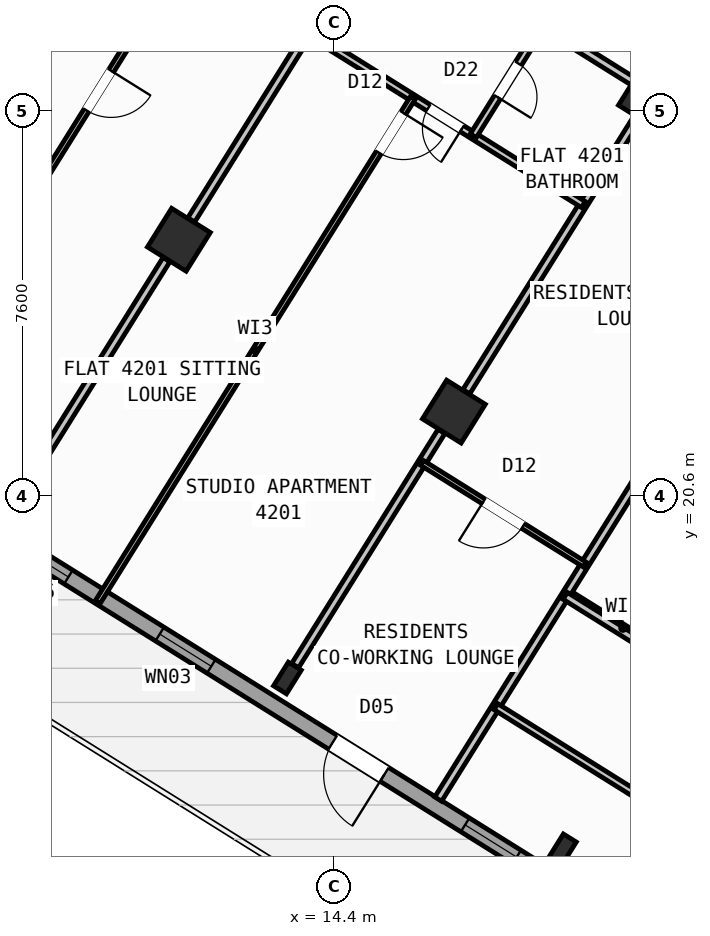
"""IFC4 building model, lengths in metres.
Left out: names, types, materials, properties, quantities, classifications, styles, units other than length and angle.
Written with IfcOpenShell. Run it as: python <this file> out.ifc"""

import sys

from ifc_helpers import new_model, si_unit, direction, frame, frame_2d, origin, origin_2d, place, context, subcontext, project, spatial, rectangle, hollow_rectangle, i_section, extrude, source, transform, mapped, element, fill, save


model = new_model("IFC4")
c1 = context("Model", 3, precision=1e-05, world=origin(), true_north=direction((0.0, 1.0)))
c2 = subcontext(c1, "Body", "Model", "MODEL_VIEW")
j1 = project(units=[si_unit("LENGTHUNIT", "METRE"), si_unit("PLANEANGLEUNIT", "RADIAN")], contexts=[c1])
p1 = place(None, origin())
s1 = spatial("IfcSite", under=j1, at=p1, CompositionType="ELEMENT")
p2 = place(p1, origin())
s2 = spatial("IfcBuilding", under=s1, at=p2, CompositionType="ELEMENT")
p3 = place(p2, frame((0.0, 0.0, 165.9)))
s3 = spatial("IfcBuildingStorey", under=s2, at=p3, CompositionType="ELEMENT", Elevation=165.9)
m1 = source(origin(), c2, "Body", "SweptSolid", [
    extrude(i_section(OverallWidth=0.3, OverallDepth=0.55, WebThickness=0.015, FlangeThickness=0.029, at=origin_2d()), origin(), (0.0, 0.0, 1.0), 3.6),
])
p4 = place(p3, frame((18.906, 13.612, 0.0), z_axis=(0.0, 0.0, 1.0), x_axis=(-0.848048096156, 0.529919264233, 0.0)))
e1 = element("IfcColumn", 1, at=p4, inside=s3, PredefinedType="COLUMN", context=c2, shape_type="MappedRepresentation", body=[
    mapped(m1, transform((0.0, 0.0, 0.0), scale=1.0)),
])
m2 = source(origin(), c2, "Body", "SweptSolid", [
    extrude(hollow_rectangle(XDim=0.9, YDim=0.9, WallThickness=0.036, at=origin_2d()), origin(), (0.0, 0.0, 1.0), 3.6),
])
for number, where, z_axis, x_axis in (
    (2, (20.632, 28.452, 0.0), (0.0, 0.0, 1.0), (-0.848, 0.53, 0.0)),
    (3, (16.764, 22.261, 0.0), (0.0, 0.0, 1.0), (-0.848, 0.53, 0.0)),
):
    element("IfcColumn", number, at=place(p3, frame(where, z_axis=z_axis, x_axis=x_axis)), inside=s3, PredefinedType="COLUMN", context=c2, shape_type="MappedRepresentation", body=[
        mapped(m2, transform((0.0, 0.0, 0.0), scale=1.0)),
    ])
p5 = place(p3, frame((13.478, 17.003, 0.0), z_axis=(0.0, 0.0, 1.0), x_axis=(-0.848048096156, 0.529919264233, 0.0)))
e4 = element("IfcColumn", 4, at=p5, inside=s3, PredefinedType="COLUMN", context=c2, shape_type="MappedRepresentation", body=[
    mapped(m1, transform((0.0, 0.0, 0.0), scale=1.0)),
])
p6 = place(p3, frame((11.336, 25.653, 0.0), z_axis=(0.0, 0.0, 1.0), x_axis=(-0.848048096156, 0.529919264233, 0.0)))
e5 = element("IfcColumn", 5, at=p6, inside=s3, PredefinedType="COLUMN", context=c2, shape_type="MappedRepresentation", body=[
    mapped(m2, transform((0.0, 0.0, 0.0), scale=1.0)),
])
p7 = place(p3, frame((29.268, 6.429, 0.0), z_axis=(0.0, 0.0, 1.0), x_axis=(-0.848049971435, 0.529916263149, 0.0)))
e6 = element("IfcWall", 6, at=p7, inside=s3, PredefinedType="STANDARD", context=c2, shape_type="SweptSolid", body=[
    extrude(rectangle(XDim=31.588, YDim=0.32, at=frame_2d((15.794, 0.0))), origin(), (0.0, 0.0, 1.0), 3.32),
])
p8 = place(p7, frame((16.362, 0.0, 0.0)))
e7 = element("IfcOpeningElement", 7, at=p8, cuts=e6, PredefinedType="OPENING", context=c2, shape_type="SweptSolid", body=[
    extrude(rectangle(XDim=1.2, YDim=2.15, at=frame_2d((0.6, 1.075))), frame((0.0, 0.17, 0.0), z_axis=(0.0, -1.0, 0.0), x_axis=(1.0, 0.0, 0.0)), (0.0, 0.0, 1.0), 0.34),
])
p9 = place(p7, frame((2.989, 0.0, 0.8)))
e8 = element("IfcOpeningElement", 8, at=p9, cuts=e6, PredefinedType="OPENING", context=c2, shape_type="SweptSolid", body=[
    extrude(rectangle(XDim=2.1, YDim=1.55, at=frame_2d((1.05, 0.775))), frame((0.0, 0.17, 0.0), z_axis=(0.0, -1.0, 0.0), x_axis=(1.0, 0.0, 0.0)), (0.0, 0.0, 1.0), 0.34),
])
p10 = place(p7, frame((8.359, 0.0, 0.8)))
e9 = element("IfcOpeningElement", 9, at=p10, cuts=e6, PredefinedType="OPENING", context=c2, shape_type="SweptSolid", body=[
    extrude(rectangle(XDim=2.1, YDim=1.55, at=frame_2d((1.05, 0.775))), frame((0.0, 0.17, 0.0), z_axis=(0.0, -1.0, 0.0), x_axis=(1.0, 0.0, 0.0)), (0.0, 0.0, 1.0), 0.34),
])
p11 = place(p7, frame((13.284, 0.0, 0.95)))
e10 = element("IfcOpeningElement", 10, at=p11, cuts=e6, PredefinedType="OPENING", context=c2, shape_type="SweptSolid", body=[
    extrude(rectangle(XDim=1.2, YDim=1.4, at=frame_2d((0.6, 0.7))), frame((0.0, 0.17, 0.0), z_axis=(0.0, -1.0, 0.0), x_axis=(1.0, 0.0, 0.0)), (0.0, 0.0, 1.0), 0.34),
])
p12 = place(p7, frame((20.39, 0.0, 0.95)))
e11 = element("IfcOpeningElement", 11, at=p12, cuts=e6, PredefinedType="OPENING", context=c2, shape_type="SweptSolid", body=[
    extrude(rectangle(XDim=1.2, YDim=1.4, at=frame_2d((0.6, 0.7))), frame((0.0, 0.17, 0.0), z_axis=(0.0, -1.0, 0.0), x_axis=(1.0, 0.0, 0.0)), (0.0, 0.0, 1.0), 0.34),
])
p13 = place(p7, frame((23.715, 0.0, 1.0)))
e12 = element("IfcOpeningElement", 12, at=p13, cuts=e6, PredefinedType="OPENING", context=c2, shape_type="SweptSolid", body=[
    extrude(rectangle(XDim=0.9, YDim=1.25, at=frame_2d((0.45, 0.625))), frame((0.0, 0.17, 0.0), z_axis=(0.0, -1.0, 0.0), x_axis=(1.0, 0.0, 0.0)), (0.0, 0.0, 1.0), 0.34),
])
p14 = place(p7, frame((26.106, 0.0, 0.85)))
e13 = element("IfcOpeningElement", 13, at=p14, cuts=e6, PredefinedType="OPENING", context=c2, shape_type="SweptSolid", body=[
    extrude(rectangle(XDim=1.5, YDim=1.5, at=frame_2d((0.75, 0.75))), frame((0.0, 0.17, 0.0), z_axis=(0.0, -1.0, 0.0), x_axis=(1.0, 0.0, 0.0)), (0.0, 0.0, 1.0), 0.34),
])
p15 = place(p7, frame((29.068, 0.0, 0.85)))
e14 = element("IfcOpeningElement", 14, at=p15, cuts=e6, PredefinedType="OPENING", context=c2, shape_type="SweptSolid", body=[
    extrude(rectangle(XDim=1.8, YDim=1.5, at=frame_2d((0.9, 0.75))), frame((0.0, 0.17, 0.0), z_axis=(0.0, -1.0, 0.0), x_axis=(1.0, 0.0, 0.0)), (0.0, 0.0, 1.0), 0.34),
])
p16 = place(p3, frame((2.415, 23.452, 0.0), z_axis=(0.0, 0.0, 1.0), x_axis=(0.52991049553, 0.848053575387, 0.0)))
e15 = element("IfcWall", 15, at=p16, inside=s3, PredefinedType="STANDARD", context=c2, shape_type="SweptSolid", body=[
    extrude(rectangle(XDim=21.587, YDim=0.32, at=frame_2d((10.794, 0.0))), origin(), (0.0, 0.0, 1.0), 2.795),
])
p17 = place(p16, frame((1.673, 0.0, 0.8)))
e16 = element("IfcOpeningElement", 16, at=p17, cuts=e15, PredefinedType="OPENING", context=c2, shape_type="SweptSolid", body=[
    extrude(rectangle(XDim=2.1, YDim=1.55, at=frame_2d((1.05, 0.775))), frame((0.0, 0.17, 0.0), z_axis=(0.0, -1.0, 0.0), x_axis=(1.0, 0.0, 0.0)), (0.0, 0.0, 1.0), 0.34),
])
p18 = place(p16, frame((8.334, 0.0, 0.85)))
e17 = element("IfcOpeningElement", 17, at=p18, cuts=e15, PredefinedType="OPENING", context=c2, shape_type="SweptSolid", body=[
    extrude(rectangle(XDim=1.8, YDim=1.5, at=frame_2d((0.9, 0.75))), frame((0.0, 0.17, 0.0), z_axis=(0.0, -1.0, 0.0), x_axis=(1.0, 0.0, 0.0)), (0.0, 0.0, 1.0), 0.34),
])
p19 = place(p16, frame((17.172, 0.0, 0.85)))
e18 = element("IfcOpeningElement", 18, at=p19, cuts=e15, PredefinedType="OPENING", context=c2, shape_type="SweptSolid", body=[
    extrude(rectangle(XDim=1.5, YDim=1.5, at=frame_2d((0.75, 0.75))), frame((0.0, 0.17, 0.0), z_axis=(0.0, -1.0, 0.0), x_axis=(1.0, 0.0, 0.0)), (0.0, 0.0, 1.0), 0.34),
])
p20 = place(p3, frame((14.138, 41.825, 0.0), z_axis=(0.0, 0.0, 1.0), x_axis=(0.848046498049, -0.529921821731, 0.0)))
e19 = element("IfcWall", 19, at=p20, inside=s3, PredefinedType="STANDARD", context=c2, shape_type="SweptSolid", body=[
    extrude(rectangle(XDim=31.588, YDim=0.32, at=frame_2d((15.794, 0.0))), origin(), (0.0, 0.0, 1.0), 3.32),
])
p21 = place(p20, frame((3.253, 0.0, 0.0)))
e20 = element("IfcOpeningElement", 20, at=p21, cuts=e19, PredefinedType="OPENING", context=c2, shape_type="SweptSolid", body=[
    extrude(rectangle(XDim=1.05, YDim=2.15, at=frame_2d((0.525, 1.075))), frame((0.0, 0.17, 0.0), z_axis=(0.0, -1.0, 0.0), x_axis=(1.0, 0.0, 0.0)), (0.0, 0.0, 1.0), 0.34),
])
p22 = place(p20, frame((0.863, 0.0, 0.85)))
e21 = element("IfcOpeningElement", 21, at=p22, cuts=e19, PredefinedType="OPENING", context=c2, shape_type="SweptSolid", body=[
    extrude(rectangle(XDim=1.8, YDim=1.5, at=frame_2d((0.9, 0.75))), frame((0.0, 0.17, 0.0), z_axis=(0.0, -1.0, 0.0), x_axis=(1.0, 0.0, 0.0)), (0.0, 0.0, 1.0), 0.34),
])
p23 = place(p20, frame((8.494, 0.0, 0.85)))
e22 = element("IfcOpeningElement", 22, at=p23, cuts=e19, PredefinedType="OPENING", context=c2, shape_type="SweptSolid", body=[
    extrude(rectangle(XDim=1.8, YDim=1.5, at=frame_2d((0.9, 0.75))), frame((0.0, 0.17, 0.0), z_axis=(0.0, -1.0, 0.0), x_axis=(1.0, 0.0, 0.0)), (0.0, 0.0, 1.0), 0.34),
])
p24 = place(p20, frame((13.874, 0.0, 0.85)))
e23 = element("IfcOpeningElement", 23, at=p24, cuts=e19, PredefinedType="OPENING", context=c2, shape_type="SweptSolid", body=[
    extrude(rectangle(XDim=1.5, YDim=1.5, at=frame_2d((0.75, 0.75))), frame((0.0, 0.17, 0.0), z_axis=(0.0, -1.0, 0.0), x_axis=(1.0, 0.0, 0.0)), (0.0, 0.0, 1.0), 0.34),
])
p25 = place(p20, frame((17.104, 0.0, 1.0)))
e24 = element("IfcOpeningElement", 24, at=p25, cuts=e19, PredefinedType="OPENING", context=c2, shape_type="SweptSolid", body=[
    extrude(rectangle(XDim=0.9, YDim=1.25, at=frame_2d((0.45, 0.625))), frame((0.0, 0.17, 0.0), z_axis=(0.0, -1.0, 0.0), x_axis=(1.0, 0.0, 0.0)), (0.0, 0.0, 1.0), 0.34),
])
p26 = place(p20, frame((22.144, 0.0, 1.0)))
e25 = element("IfcOpeningElement", 25, at=p26, cuts=e19, PredefinedType="OPENING", context=c2, shape_type="SweptSolid", body=[
    extrude(rectangle(XDim=0.9, YDim=1.25, at=frame_2d((0.45, 0.625))), frame((0.0, 0.17, 0.0), z_axis=(0.0, -1.0, 0.0), x_axis=(1.0, 0.0, 0.0)), (0.0, 0.0, 1.0), 0.34),
])
p27 = place(p20, frame((27.744, 0.0, 1.0)))
e26 = element("IfcOpeningElement", 26, at=p27, cuts=e19, PredefinedType="OPENING", context=c2, shape_type="SweptSolid", body=[
    extrude(rectangle(XDim=0.9, YDim=1.25, at=frame_2d((0.45, 0.625))), frame((0.0, 0.17, 0.0), z_axis=(0.0, -1.0, 0.0), x_axis=(1.0, 0.0, 0.0)), (0.0, 0.0, 1.0), 0.34),
])
p28 = place(p3, frame((21.206, 17.292, 0.0), z_axis=(0.0, 0.0, 1.0), x_axis=(-0.848050851465, 0.529914854792, 0.0)))
e27 = element("IfcWall", 27, at=p28, inside=s3, PredefinedType="PARTITIONING", context=c2, shape_type="SweptSolid", body=[
    extrude(rectangle(XDim=2.61, YDim=0.16, at=frame_2d((1.305, 0.0))), origin(), (0.0, 0.0, 1.0), 3.31),
])
p29 = place(p3, frame((23.899, 26.529, 0.0), z_axis=(0.0, 0.0, 1.0), x_axis=(-0.529917716469, -0.848049063305, 0.0)))
e28 = element("IfcWall", 28, at=p29, inside=s3, PredefinedType="PARTITIONING", context=c2, shape_type="SweptSolid", body=[
    extrude(rectangle(XDim=14.05, YDim=0.16, at=frame_2d((7.025, 0.0))), origin(), (0.0, 0.0, 1.0), 3.31),
])
p30 = place(p3, frame((25.065, 28.394, 0.0), z_axis=(0.0, 0.0, 1.0), x_axis=(-0.848048310262, 0.529918921593, 0.0)))
e29 = element("IfcWall", 29, at=p30, inside=s3, PredefinedType="PARTITIONING", context=c2, shape_type="SweptSolid", body=[
    extrude(rectangle(XDim=16.73, YDim=0.16, at=frame_2d((8.365, 0.0))), origin(), (0.0, 0.0, 1.0), 3.31),
])
p31 = place(p30, frame((2.22, 0.0, 0.0)))
e30 = element("IfcOpeningElement", 30, at=p31, cuts=e29, PredefinedType="OPENING", context=c2, shape_type="SweptSolid", body=[
    extrude(rectangle(XDim=0.86, YDim=2.05, at=frame_2d((0.43, 1.025))), frame((0.0, 0.09, 0.0), z_axis=(0.0, -1.0, 0.0), x_axis=(1.0, 0.0, 0.0)), (0.0, 0.0, 1.0), 0.18),
])
p32 = place(p30, frame((7.82, 0.0, 0.0)))
e31 = element("IfcOpeningElement", 31, at=p32, cuts=e29, PredefinedType="OPENING", context=c2, shape_type="SweptSolid", body=[
    extrude(rectangle(XDim=1.0, YDim=2.1, at=frame_2d((0.5, 1.05))), frame((0.0, 0.09, 0.0), z_axis=(0.0, -1.0, 0.0), x_axis=(1.0, 0.0, 0.0)), (0.0, 0.0, 1.0), 0.18),
])
p33 = place(p30, frame((12.95, 0.0, 0.0)))
e32 = element("IfcOpeningElement", 32, at=p33, cuts=e29, PredefinedType="OPENING", context=c2, shape_type="SweptSolid", body=[
    extrude(rectangle(XDim=1.0, YDim=2.1, at=frame_2d((0.5, 1.05))), frame((0.0, 0.09, 0.0), z_axis=(0.0, -1.0, 0.0), x_axis=(1.0, 0.0, 0.0)), (0.0, 0.0, 1.0), 0.18),
])
p34 = place(p3, frame((20.293, 28.782, 0.0), z_axis=(0.0, 0.0, 1.0), x_axis=(-0.848040881926, 0.529930809241, 0.0)))
e33 = element("IfcWall", 33, at=p34, inside=s3, PredefinedType="PARTITIONING", context=c2, shape_type="SweptSolid", body=[
    extrude(rectangle(XDim=5.476, YDim=0.16, at=frame_2d((2.738, 0.0))), origin(), (0.0, 0.0, 1.0), 2.795),
])
p35 = place(p34, frame((3.568, 0.0, 0.0)))
e34 = element("IfcOpeningElement", 34, at=p35, cuts=e33, PredefinedType="OPENING", context=c2, shape_type="SweptSolid", body=[
    extrude(rectangle(XDim=1.0, YDim=2.1, at=frame_2d((0.5, 1.05))), frame((0.0, 0.09, 0.0), z_axis=(0.0, -1.0, 0.0), x_axis=(1.0, 0.0, 0.0)), (0.0, 0.0, 1.0), 0.18),
])
p36 = place(p3, frame((20.387, 28.06, 0.0), z_axis=(0.0, 0.0, 1.0), x_axis=(-0.529902564924, -0.848058530814, 0.0)))
e35 = element("IfcWall", 35, at=p36, inside=s3, PredefinedType="PARTITIONING", context=c2, shape_type="SweptSolid", body=[
    extrude(rectangle(XDim=6.376, YDim=0.16, at=frame_2d((3.188, 0.0))), origin(), (0.0, 0.0, 1.0), 2.795),
])
p37 = place(p3, frame((16.519, 21.87, 0.0), z_axis=(0.0, 0.0, 1.0), x_axis=(-0.529922447305, -0.848046107144, 0.0)))
e36 = element("IfcWall", 36, at=p37, inside=s3, PredefinedType="PARTITIONING", context=c2, shape_type="SweptSolid", body=[
    extrude(rectangle(XDim=5.451, YDim=0.16, at=frame_2d((2.726, 0.0))), origin(), (0.0, 0.0, 1.0), 2.795),
])
p38 = place(p3, frame((19.346, 19.242, 0.0), z_axis=(0.0, 0.0, 1.0), x_axis=(-0.848059820872, 0.529900500304, 0.0)))
e37 = element("IfcWall", 37, at=p38, inside=s3, PredefinedType="PARTITIONING", context=c2, shape_type="SweptSolid", body=[
    extrude(rectangle(XDim=3.79, YDim=0.11, at=frame_2d((1.895, 0.0))), origin(), (0.0, 0.0, 1.0), 3.31),
])
p39 = place(p38, frame((1.435, 0.0, 0.0)))
e38 = element("IfcOpeningElement", 38, at=p39, cuts=e37, PredefinedType="OPENING", context=c2, shape_type="SweptSolid", body=[
    extrude(rectangle(XDim=0.92, YDim=2.08, at=frame_2d((0.46, 1.04))), frame((0.0, 0.065, 0.0), z_axis=(0.0, -1.0, 0.0), x_axis=(1.0, 0.0, 0.0)), (0.0, 0.0, 1.0), 0.13),
])
p40 = place(p3, frame((14.96, 31.452, 0.0), z_axis=(0.0, 0.0, 1.0), x_axis=(-0.529947310719, -0.848030570122, 0.0)))
e39 = element("IfcWall", 39, at=p40, inside=s3, PredefinedType="PARTITIONING", context=c2, shape_type="SweptSolid", body=[
    extrude(rectangle(XDim=6.376, YDim=0.16, at=frame_2d((3.188, 0.0))), origin(), (0.0, 0.0, 1.0), 2.795),
])
p41 = place(p3, frame((11.091, 25.261, 0.0), z_axis=(0.0, 0.0, 1.0), x_axis=(-0.52994257524, -0.848033529377, 0.0)))
e40 = element("IfcWall", 40, at=p41, inside=s3, PredefinedType="PARTITIONING", context=c2, shape_type="SweptSolid", body=[
    extrude(rectangle(XDim=5.451, YDim=0.16, at=frame_2d((2.726, 0.0))), origin(), (0.0, 0.0, 1.0), 2.795),
])
p42 = place(p3, frame((19.318, 26.349, 0.0), z_axis=(0.0, 0.0, 1.0), x_axis=(-0.848039019877, 0.529933789039, 0.0)))
e41 = element("IfcWall", 41, at=p42, inside=s3, PredefinedType="PLUMBINGWALL", context=c2, shape_type="SweptSolid", body=[
    extrude(rectangle(XDim=6.4, YDim=0.14, at=frame_2d((3.2, 0.0))), origin(), (0.0, 0.0, 1.0), 3.31),
])
p43 = place(p42, frame((2.824, 0.0, 0.0)))
e42 = element("IfcOpeningElement", 42, at=p43, cuts=e41, PredefinedType="OPENING", context=c2, shape_type="SweptSolid", body=[
    extrude(rectangle(XDim=0.78, YDim=2.05, at=frame_2d((0.39, 1.025))), frame((0.0, 0.08, 0.0), z_axis=(0.0, -1.0, 0.0), x_axis=(1.0, 0.0, 0.0)), (0.0, 0.0, 1.0), 0.16),
])
p44 = place(p3, frame((18.514, 29.894, 0.0), z_axis=(0.0, 0.0, 1.0), x_axis=(-0.529913878929, -0.848051461244, 0.0)))
e43 = element("IfcWall", 43, at=p44, inside=s3, PredefinedType="PLUMBINGWALL", context=c2, shape_type="SweptSolid", body=[
    extrude(rectangle(XDim=2.58, YDim=0.14, at=frame_2d((1.29, 0.0))), origin(), (0.0, 0.0, 1.0), 3.31),
])
p45 = place(p44, frame((0.9, 0.0, 0.0)))
e44 = element("IfcOpeningElement", 44, at=p45, cuts=e43, PredefinedType="OPENING", context=c2, shape_type="SweptSolid", body=[
    extrude(rectangle(XDim=0.78, YDim=2.05, at=frame_2d((0.39, 1.025))), frame((0.0, 0.08, 0.0), z_axis=(0.0, -1.0, 0.0), x_axis=(1.0, 0.0, 0.0)), (0.0, 0.0, 1.0), 0.16),
])
p46 = place(p3, frame((15.953, 28.452, 0.0), z_axis=(0.0, 0.0, 1.0), x_axis=(-0.529931645041, -0.848040359643, 0.0)))
e45 = element("IfcWall", 45, at=p46, inside=s3, PredefinedType="PARTITIONING", context=c2, shape_type="SweptSolid", body=[
    extrude(rectangle(XDim=11.74, YDim=0.11, at=frame_2d((5.87, 0.0))), origin(), (0.0, 0.0, 1.0), 3.31),
])
p47 = place(p46, frame((0.35, 0.0, 0.0)))
e46 = element("IfcOpeningElement", 46, at=p47, cuts=e45, PredefinedType="OPENING", context=c2, shape_type="SweptSolid", body=[
    extrude(rectangle(XDim=0.92, YDim=2.08, at=frame_2d((0.46, 1.04))), frame((0.0, 0.065, 0.0), z_axis=(0.0, -1.0, 0.0), x_axis=(1.0, 0.0, 0.0)), (0.0, 0.0, 1.0), 0.13),
])
p48 = place(p3, frame((12.798, 33.465, 0.0), z_axis=(0.0, 0.0, 1.0), x_axis=(-0.529916182913, -0.848050021571, 0.0)))
e47 = element("IfcWall", 47, at=p48, inside=s3, PredefinedType="PARTITIONING", context=c2, shape_type="SweptSolid", body=[
    extrude(rectangle(XDim=14.32, YDim=0.11, at=frame_2d((7.16, 0.0))), origin(), (0.0, 0.0, 1.0), 3.31),
])
p49 = place(p48, frame((0.76, 0.0, 0.0)))
e48 = element("IfcOpeningElement", 48, at=p49, cuts=e47, PredefinedType="OPENING", context=c2, shape_type="SweptSolid", body=[
    extrude(rectangle(XDim=0.78, YDim=2.05, at=frame_2d((0.39, 1.025))), frame((0.0, 0.065, 0.0), z_axis=(0.0, -1.0, 0.0), x_axis=(1.0, 0.0, 0.0)), (0.0, 0.0, 1.0), 0.13),
])
p50 = place(p48, frame((5.281, 0.0, 0.0)))
e49 = element("IfcOpeningElement", 49, at=p50, cuts=e47, PredefinedType="OPENING", context=c2, shape_type="SweptSolid", body=[
    extrude(rectangle(XDim=0.92, YDim=2.08, at=frame_2d((0.46, 1.04))), frame((0.0, 0.065, 0.0), z_axis=(0.0, -1.0, 0.0), x_axis=(1.0, 0.0, 0.0)), (0.0, 0.0, 1.0), 0.13),
])
p51 = place(p3, frame((32.164, 10.374, 0.0), z_axis=(0.0, 0.0, 1.0), x_axis=(-0.848044107957, 0.529925646633, 0.0)))
e50 = element("IfcWall", 50, at=p51, inside=s3, PredefinedType="PARTITIONING", context=c2, shape_type="SweptSolid", body=[
    extrude(rectangle(XDim=15.57, YDim=0.16, at=frame_2d((7.785, 0.0))), origin(), (0.0, 0.0, 1.0), 3.31),
])
p52 = place(p51, frame((10.83, 0.0, 0.0)))
e51 = element("IfcOpeningElement", 51, at=p52, cuts=e50, PredefinedType="OPENING", context=c2, shape_type="SweptSolid", body=[
    extrude(rectangle(XDim=1.0, YDim=2.1, at=frame_2d((0.5, 1.05))), frame((0.0, 0.09, 0.0), z_axis=(0.0, -1.0, 0.0), x_axis=(1.0, 0.0, 0.0)), (0.0, 0.0, 1.0), 0.18),
])
p53 = place(p3, frame((29.72, 8.859, 0.0), z_axis=(0.0, 0.0, 1.0), x_axis=(-0.848049134363, 0.529917602752, 0.0)))
e52 = element("IfcWall", 52, at=p53, inside=s3, PredefinedType="PLUMBINGWALL", context=c2, shape_type="SweptSolid", body=[
    extrude(rectangle(XDim=14.3, YDim=0.14, at=frame_2d((7.15, 0.0))), origin(), (0.0, 0.0, 1.0), 3.31),
])
p54 = place(p53, frame((9.57, 0.0, 0.0)))
e53 = element("IfcOpeningElement", 53, at=p54, cuts=e52, PredefinedType="OPENING", context=c2, shape_type="SweptSolid", body=[
    extrude(rectangle(XDim=0.92, YDim=2.08, at=frame_2d((0.46, 1.04))), frame((0.0, 0.08, 0.0), z_axis=(0.0, -1.0, 0.0), x_axis=(1.0, 0.0, 0.0)), (0.0, 0.0, 1.0), 0.16),
])
m3 = source(origin(), c2, "Body", "SweptSolid", [
    extrude(rectangle(XDim=1.2, YDim=2.15, at=frame_2d((0.6, 1.075))), frame((0.0, 0.025, 0.0), z_axis=(0.0, -1.0, 0.0), x_axis=(1.0, 0.0, 0.0)), (0.0, 0.0, 1.0), 0.05),
])
p55 = place(p8, origin())
e54 = element("IfcDoor", 54, at=p55, inside=s3, OperationType="SINGLE_SWING_LEFT", PredefinedType="DOOR", context=c2, shape_type="MappedRepresentation", body=[
    mapped(m3, transform((0.0, 0.0, 0.0), scale=1.0)),
])
fill(e7, e54)
m4 = source(origin(), c2, "Body", "SweptSolid", [
    extrude(rectangle(XDim=1.2, YDim=1.4, at=frame_2d((0.6, 0.7))), frame((0.0, 0.03, 0.0), z_axis=(0.0, -1.0, 0.0), x_axis=(1.0, 0.0, 0.0)), (0.0, 0.0, 1.0), 0.06),
])
p56 = place(p11, origin())
e55 = element("IfcWindow", 55, at=p56, inside=s3, PartitioningType="SINGLE_PANEL", PredefinedType="WINDOW", context=c2, shape_type="MappedRepresentation", body=[
    mapped(m4, transform((0.0, 0.0, 0.0), scale=1.0)),
])
fill(e10, e55)
p57 = place(p12, origin())
e56 = element("IfcWindow", 56, at=p57, inside=s3, PartitioningType="SINGLE_PANEL", PredefinedType="WINDOW", context=c2, shape_type="MappedRepresentation", body=[
    mapped(m4, transform((0.0, 0.0, 0.0), scale=1.0)),
])
fill(e11, e56)
m5 = source(origin(), c2, "Body", "SweptSolid", [
    extrude(rectangle(XDim=0.9, YDim=1.25, at=frame_2d((0.45, 0.625))), frame((0.0, 0.03, 0.0), z_axis=(0.0, -1.0, 0.0), x_axis=(1.0, 0.0, 0.0)), (0.0, 0.0, 1.0), 0.06),
])
p58 = place(p13, origin())
e57 = element("IfcWindow", 57, at=p58, inside=s3, PartitioningType="SINGLE_PANEL", PredefinedType="WINDOW", context=c2, shape_type="MappedRepresentation", body=[
    mapped(m5, transform((0.0, 0.0, 0.0), scale=1.0)),
])
fill(e12, e57)
m6 = source(origin(), c2, "Body", "SweptSolid", [
    extrude(rectangle(XDim=0.92, YDim=2.08, at=frame_2d((0.46, 1.04))), frame((0.0, 0.025, 0.0), z_axis=(0.0, -1.0, 0.0), x_axis=(1.0, 0.0, 0.0)), (0.0, 0.0, 1.0), 0.05),
])
p59 = place(p39, origin())
e58 = element("IfcDoor", 58, at=p59, inside=s3, OperationType="SINGLE_SWING_RIGHT", PredefinedType="DOOR", context=c2, shape_type="MappedRepresentation", body=[
    mapped(m6, transform((0.0, 0.0, 0.0), scale=1.0)),
])
fill(e38, e58)
p60 = place(p47, origin())
e59 = element("IfcDoor", 59, at=p60, inside=s3, OperationType="SINGLE_SWING_LEFT", PredefinedType="DOOR", context=c2, shape_type="MappedRepresentation", body=[
    mapped(m6, transform((0.0, 0.0, 0.0), scale=1.0)),
])
fill(e46, e59)
m7 = source(origin(), c2, "Body", "SweptSolid", [
    extrude(rectangle(XDim=0.78, YDim=2.05, at=frame_2d((0.39, 1.025))), frame((0.0, 0.025, 0.0), z_axis=(0.0, -1.0, 0.0), x_axis=(1.0, 0.0, 0.0)), (0.0, 0.0, 1.0), 0.05),
])
p61 = place(p43, origin())
e60 = element("IfcDoor", 60, at=p61, inside=s3, OperationType="SINGLE_SWING_LEFT", PredefinedType="DOOR", context=c2, shape_type="MappedRepresentation", body=[
    mapped(m7, transform((0.0, 0.0, 0.0), scale=1.0)),
])
fill(e42, e60)
p62 = place(p45, origin())
e61 = element("IfcDoor", 61, at=p62, inside=s3, OperationType="SINGLE_SWING_RIGHT", PredefinedType="DOOR", context=c2, shape_type="MappedRepresentation", body=[
    mapped(m7, transform((0.0, 0.0, 0.0), scale=1.0)),
])
fill(e44, e61)
p63 = place(p50, origin())
e62 = element("IfcDoor", 62, at=p63, inside=s3, OperationType="SINGLE_SWING_LEFT", PredefinedType="DOOR", context=c2, shape_type="MappedRepresentation", body=[
    mapped(m6, transform((0.0, 0.0, 0.0), scale=1.0)),
])
fill(e49, e62)
save(model, sys.argv[1])
